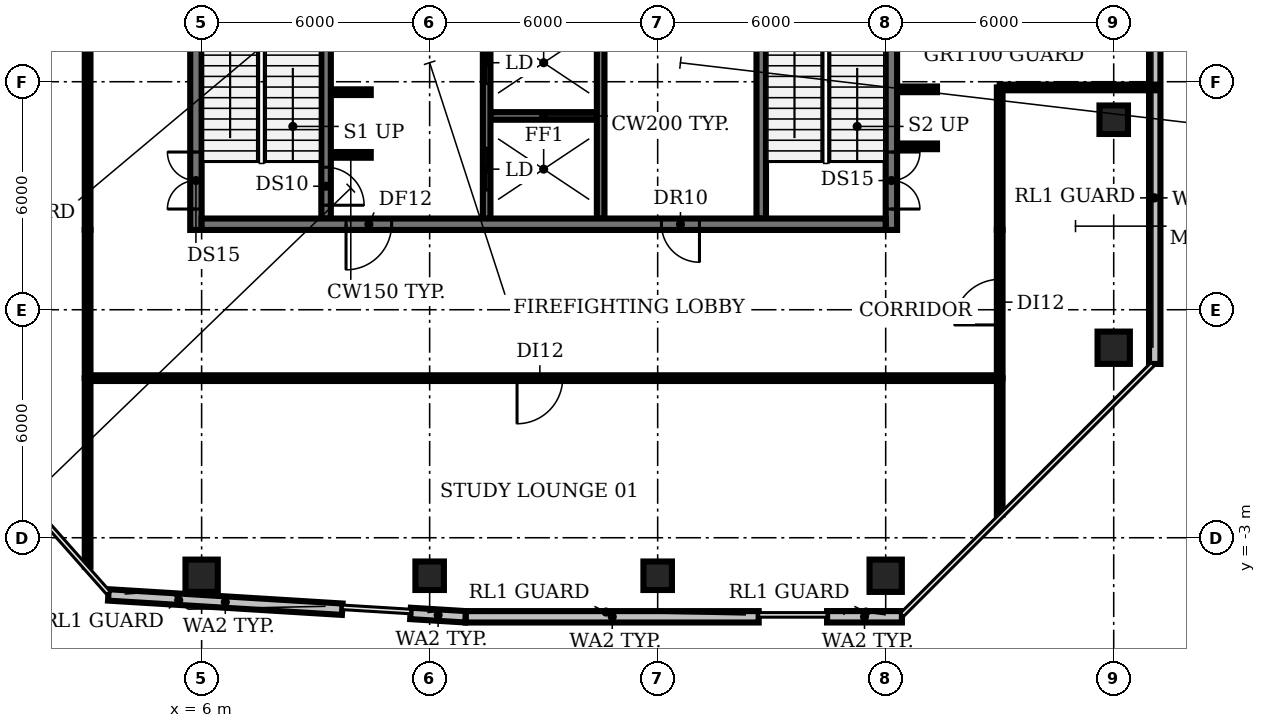
"""IFC4 building model, lengths in metres.
Left out: names, types, materials, properties, quantities, classifications, styles, units other than length and angle.
Written with IfcOpenShell. Run it as: python <this file> out.ifc"""

import sys

from ifc_helpers import new_model, si_unit, direction, frame, frame_2d, origin, origin_2d, place, context, subcontext, project, spatial, rectangle, circle, extrude, element, fill, save


model = new_model("IFC4")
c1 = context("Model", 3, precision=1e-05, world=origin(), true_north=direction((0.0, 1.0)))
c2 = subcontext(c1, "Body", "Model", "MODEL_VIEW")
j1 = project(units=[si_unit("LENGTHUNIT", "METRE"), si_unit("PLANEANGLEUNIT", "RADIAN")], contexts=[c1])
p1 = place(None, origin())
s1 = spatial("IfcSite", under=j1, at=p1, CompositionType="ELEMENT")
p2 = place(p1, origin())
s2 = spatial("IfcBuilding", under=s1, at=p2, CompositionType="ELEMENT")
p3 = place(p2, frame((0.0, 0.0, 272.6)))
s3 = spatial("IfcBuildingStorey", under=s2, at=p3, CompositionType="ELEMENT", Elevation=272.6)
p4 = place(p3, frame((6.0, -4.0, 0.0), z_axis=(0.0, 0.0, 1.0), x_axis=(1.0, 0.0, 0.0)))
e1 = element("IfcColumn", 1, at=p4, inside=s3, PredefinedType="COLUMN", context=c2, shape_type="SweptSolid", body=[
    extrude(circle(Radius=0.425, at=origin_2d()), origin(), (0.0, 0.0, 1.0), 3.85),
])
for number, where, z_axis, x_axis in (
    (2, (12.0, -4.0, 0.0), (0.0, 0.0, 1.0), (1.0, 0.0, 0.0)),
    (3, (18.0, -4.0, 0.0), (0.0, 0.0, 1.0), (1.0, 0.0, 0.0)),
):
    element("IfcColumn", number, at=place(p3, frame(where, z_axis=z_axis, x_axis=x_axis)), inside=s3, PredefinedType="COLUMN", context=c2, shape_type="SweptSolid", body=[
        extrude(rectangle(XDim=0.75, YDim=0.75, at=origin_2d()), origin(), (0.0, 0.0, 1.0), 3.85),
    ])
for number, where, z_axis, x_axis in (
    (4, (24.0, -4.0, 0.0), (0.0, 0.0, 1.0), (1.0, 0.0, 0.0)),
    (5, (30.0, 2.0, 0.0), (0.0, 0.0, 1.0), (1.0, 0.0, 0.0)),
):
    element("IfcColumn", number, at=place(p3, frame(where, z_axis=z_axis, x_axis=x_axis)), inside=s3, PredefinedType="COLUMN", context=c2, shape_type="SweptSolid", body=[
        extrude(circle(Radius=0.425, at=origin_2d()), origin(), (0.0, 0.0, 1.0), 3.85),
    ])
p5 = place(p3, frame((30.0, 8.0, 0.0), z_axis=(0.0, 0.0, 1.0), x_axis=(1.0, 0.0, 0.0)))
e6 = element("IfcColumn", 6, at=p5, inside=s3, PredefinedType="COLUMN", context=c2, shape_type="SweptSolid", body=[
    extrude(rectangle(XDim=0.75, YDim=0.75, at=origin_2d()), origin(), (0.0, 0.0, 1.0), 3.85),
])
p6 = place(p3, frame((3.546, -4.504, 0.0), z_axis=(0.0, 0.0, 1.0), x_axis=(0.99813413764, -0.061059342256, 0.0)))
e7 = element("IfcWall", 7, at=p6, inside=s3, PredefinedType="SOLIDWALL", context=c2, shape_type="SweptSolid", body=[
    extrude(rectangle(XDim=6.166, YDim=0.3, at=frame_2d((3.083, 0.0))), origin(), (0.0, 0.0, 1.0), 3.85),
])
p7 = place(p3, frame((11.497, -4.991, 0.0), z_axis=(0.0, 0.0, 1.0), x_axis=(0.998133330286, -0.061072538616, 0.0)))
e8 = element("IfcWall", 8, at=p7, inside=s3, PredefinedType="SOLIDWALL", context=c2, shape_type="SweptSolid", body=[
    extrude(rectangle(XDim=1.455, YDim=0.3, at=frame_2d((0.728, 0.0))), origin(), (0.0, 0.0, 1.0), 3.85),
])
p8 = place(p3, frame((12.952, -5.08, 0.0), z_axis=(0.0, 0.0, 1.0), x_axis=(1.0, 0.0, 0.0)))
e9 = element("IfcWall", 9, at=p8, inside=s3, PredefinedType="SOLIDWALL", context=c2, shape_type="SweptSolid", body=[
    extrude(rectangle(XDim=7.706, YDim=0.3, at=frame_2d((3.853, 0.0))), origin(), (0.0, 0.0, 1.0), 3.85),
])
p9 = place(p3, frame((22.458, -5.08, 0.0), z_axis=(0.0, 0.0, 1.0), x_axis=(1.0, 0.0, 0.0)))
e10 = element("IfcWall", 10, at=p9, inside=s3, PredefinedType="SOLIDWALL", context=c2, shape_type="SweptSolid", body=[
    extrude(rectangle(XDim=1.969, YDim=0.3, at=frame_2d((0.984, 0.0))), origin(), (0.0, 0.0, 1.0), 3.85),
])
p10 = place(p3, frame((31.08, 1.573, 0.0), z_axis=(0.0, 0.0, 1.0), x_axis=(0.0, 1.0, 0.0)))
e11 = element("IfcWall", 11, at=p10, inside=s3, PredefinedType="SOLIDWALL", context=c2, shape_type="SweptSolid", body=[
    extrude(rectangle(XDim=8.74, YDim=0.3, at=frame_2d((4.37, 0.0))), origin(), (0.0, 0.0, 1.0), 3.85),
])
p11 = place(p3, frame((9.4, 7.075, 0.0), z_axis=(0.0, 0.0, 1.0), x_axis=(1.0, 0.0, 0.0)))
e12 = element("IfcWall", 12, at=p11, inside=s3, PredefinedType="SHEAR", context=c2, shape_type="SweptSolid", body=[
    extrude(rectangle(XDim=1.05, YDim=0.15, at=frame_2d((0.525, 0.0))), origin(), (0.0, 0.0, 1.0), 3.85),
])
p12 = place(p3, frame((13.6, 8.1, 0.0), z_axis=(0.0, 0.0, 1.0), x_axis=(1.0, 0.0, 0.0)))
e13 = element("IfcWall", 13, at=p12, inside=s3, PredefinedType="SHEAR", context=c2, shape_type="SweptSolid", body=[
    extrude(rectangle(XDim=2.8, YDim=0.2, at=frame_2d((1.4, 0.0))), origin(), (0.0, 0.0, 1.0), 3.85),
])
p13 = place(p3, frame((9.4, 8.725, 0.0), z_axis=(0.0, 0.0, 1.0), x_axis=(1.0, 0.0, 0.0)))
e14 = element("IfcWall", 14, at=p13, inside=s3, PredefinedType="SHEAR", context=c2, shape_type="SweptSolid", body=[
    extrude(rectangle(XDim=1.05, YDim=0.15, at=frame_2d((0.525, 0.0))), origin(), (0.0, 0.0, 1.0), 3.85),
])
p14 = place(p3, frame((9.275, 11.825, 0.0), z_axis=(0.0, 0.0, 1.0), x_axis=(0.0, -1.0, 0.0)))
e15 = element("IfcWall", 15, at=p14, inside=s3, PredefinedType="SHEAR", context=c2, shape_type="SweptSolid", body=[
    extrude(rectangle(XDim=6.425, YDim=0.25, at=frame_2d((3.212, 0.0))), origin(), (0.0, 0.0, 1.0), 3.85),
])
p15 = place(p14, frame((5.075, 0.0, 0.0)))
e16 = element("IfcOpeningElement", 16, at=p15, cuts=e15, PredefinedType="OPENING", context=c2, shape_type="SweptSolid", body=[
    extrude(rectangle(XDim=1.0, YDim=2.1, at=frame_2d((0.5, 1.05))), frame((0.0, 0.135, 0.0), z_axis=(0.0, -1.0, 0.0), x_axis=(1.0, 0.0, 0.0)), (0.0, 0.0, 1.0), 0.27),
])
p16 = place(p3, frame((13.5, 5.4, 0.0), z_axis=(0.0, 0.0, 1.0), x_axis=(0.0, 1.0, 0.0)))
e17 = element("IfcWall", 17, at=p16, inside=s3, PredefinedType="SHEAR", context=c2, shape_type="SweptSolid", body=[
    extrude(rectangle(XDim=8.2, YDim=0.2, at=frame_2d((4.1, 0.0))), origin(), (0.0, 0.0, 1.0), 3.85),
])
p17 = place(p16, frame((0.75, 0.0, 0.0)))
e18 = element("IfcOpeningElement", 18, at=p17, cuts=e17, PredefinedType="OPENING", context=c2, shape_type="SweptSolid", body=[
    extrude(rectangle(XDim=1.1, YDim=2.1, at=frame_2d((0.55, 1.05))), frame((0.0, 0.11, 0.0), z_axis=(0.0, -1.0, 0.0), x_axis=(1.0, 0.0, 0.0)), (0.0, 0.0, 1.0), 0.22),
])
p18 = place(p16, frame((3.55, 0.0, 0.0)))
e19 = element("IfcOpeningElement", 19, at=p18, cuts=e17, PredefinedType="OPENING", context=c2, shape_type="SweptSolid", body=[
    extrude(rectangle(XDim=1.1, YDim=2.1, at=frame_2d((0.55, 1.05))), frame((0.0, 0.11, 0.0), z_axis=(0.0, -1.0, 0.0), x_axis=(1.0, 0.0, 0.0)), (0.0, 0.0, 1.0), 0.22),
])
p19 = place(p16, frame((6.35, 0.0, 0.0)))
e20 = element("IfcOpeningElement", 20, at=p19, cuts=e17, PredefinedType="OPENING", context=c2, shape_type="SweptSolid", body=[
    extrude(rectangle(XDim=1.1, YDim=2.1, at=frame_2d((0.55, 1.05))), frame((0.0, 0.11, 0.0), z_axis=(0.0, -1.0, 0.0), x_axis=(1.0, 0.0, 0.0)), (0.0, 0.0, 1.0), 0.22),
])
p20 = place(p3, frame((16.5, 5.4, 0.0), z_axis=(0.0, 0.0, 1.0), x_axis=(0.0, 1.0, 0.0)))
e21 = element("IfcWall", 21, at=p20, inside=s3, PredefinedType="SHEAR", context=c2, shape_type="SweptSolid", body=[
    extrude(rectangle(XDim=8.2, YDim=0.2, at=frame_2d((4.1, 0.0))), origin(), (0.0, 0.0, 1.0), 3.85),
])
p21 = place(p3, frame((20.725, 5.4, 0.0), z_axis=(0.0, 0.0, 1.0), x_axis=(0.0, 1.0, 0.0)))
e22 = element("IfcWall", 22, at=p21, inside=s3, PredefinedType="SHEAR", context=c2, shape_type="SweptSolid", body=[
    extrude(rectangle(XDim=6.3, YDim=0.25, at=frame_2d((3.15, 0.0))), origin(), (0.0, 0.0, 1.0), 3.85),
])
p22 = place(p3, frame((5.85, 5.1, 0.0), z_axis=(0.0, 0.0, 1.0), x_axis=(0.0, 1.0, 0.0)))
e23 = element("IfcWall", 23, at=p22, inside=s3, PredefinedType="SHEAR", context=c2, shape_type="SweptSolid", body=[
    extrude(rectangle(XDim=20.0, YDim=0.3, at=frame_2d((10.0, 0.0))), origin(), (0.0, 0.0, 1.0), 3.85),
])
p23 = place(p22, frame((0.55, 0.0, 0.0)))
e24 = element("IfcOpeningElement", 24, at=p23, cuts=e23, PredefinedType="OPENING", context=c2, shape_type="SweptSolid", body=[
    extrude(rectangle(XDim=1.5, YDim=2.1, at=frame_2d((0.75, 1.05))), frame((0.0, 0.16, 0.0), z_axis=(0.0, -1.0, 0.0), x_axis=(1.0, 0.0, 0.0)), (0.0, 0.0, 1.0), 0.32),
])
p24 = place(p22, frame((7.0, 0.0, 0.0)))
e25 = element("IfcOpeningElement", 25, at=p24, cuts=e23, PredefinedType="OPENING", context=c2, shape_type="SweptSolid", body=[
    extrude(rectangle(XDim=1.2, YDim=2.1, at=frame_2d((0.6, 1.05))), frame((0.0, 0.16, 0.0), z_axis=(0.0, -1.0, 0.0), x_axis=(1.0, 0.0, 0.0)), (0.0, 0.0, 1.0), 0.32),
])
p25 = place(p22, frame((13.55, 0.0, 0.0)))
e26 = element("IfcOpeningElement", 26, at=p25, cuts=e23, PredefinedType="OPENING", context=c2, shape_type="SweptSolid", body=[
    extrude(rectangle(XDim=1.2, YDim=2.1, at=frame_2d((0.6, 1.05))), frame((0.0, 0.16, 0.0), z_axis=(0.0, -1.0, 0.0), x_axis=(1.0, 0.0, 0.0)), (0.0, 0.0, 1.0), 0.32),
])
p26 = place(p3, frame((24.15, 25.655, 0.0), z_axis=(0.0, 0.0, 1.0), x_axis=(0.0, -1.0, 0.0)))
e27 = element("IfcWall", 27, at=p26, inside=s3, PredefinedType="SHEAR", context=c2, shape_type="SweptSolid", body=[
    extrude(rectangle(XDim=20.555, YDim=0.3, at=frame_2d((10.277, 0.0))), origin(), (0.0, 0.0, 1.0), 3.85),
])
p27 = place(p26, frame((18.505, 0.0, 0.0)))
e28 = element("IfcOpeningElement", 28, at=p27, cuts=e27, PredefinedType="OPENING", context=c2, shape_type="SweptSolid", body=[
    extrude(rectangle(XDim=1.5, YDim=2.1, at=frame_2d((0.75, 1.05))), frame((0.0, 0.16, 0.0), z_axis=(0.0, -1.0, 0.0), x_axis=(1.0, 0.0, 0.0)), (0.0, 0.0, 1.0), 0.32),
])
p28 = place(p26, frame((12.405, 0.0, 0.0)))
e29 = element("IfcOpeningElement", 29, at=p28, cuts=e27, PredefinedType="OPENING", context=c2, shape_type="SweptSolid", body=[
    extrude(rectangle(XDim=0.9, YDim=2.1, at=frame_2d((0.45, 1.05))), frame((0.0, 0.16, 0.0), z_axis=(0.0, -1.0, 0.0), x_axis=(1.0, 0.0, 0.0)), (0.0, 0.0, 1.0), 0.32),
])
p29 = place(p26, frame((6.405, 0.0, 0.0)))
e30 = element("IfcOpeningElement", 30, at=p29, cuts=e27, PredefinedType="OPENING", context=c2, shape_type="SweptSolid", body=[
    extrude(rectangle(XDim=2.0, YDim=2.1, at=frame_2d((1.0, 1.05))), frame((0.0, 0.16, 0.0), z_axis=(0.0, -1.0, 0.0), x_axis=(1.0, 0.0, 0.0)), (0.0, 0.0, 1.0), 0.32),
])
p30 = place(p3, frame((24.0, 5.25, 0.0), z_axis=(0.0, 0.0, 1.0), x_axis=(-1.0, 0.0, 0.0)))
e31 = element("IfcWall", 31, at=p30, inside=s3, PredefinedType="SHEAR", context=c2, shape_type="SweptSolid", body=[
    extrude(rectangle(XDim=18.0, YDim=0.3, at=frame_2d((9.0, 0.0))), origin(), (0.0, 0.0, 1.0), 3.85),
])
p31 = place(p30, frame((13.0, 0.0, 0.0)))
e32 = element("IfcOpeningElement", 32, at=p31, cuts=e31, PredefinedType="OPENING", context=c2, shape_type="SweptSolid", body=[
    extrude(rectangle(XDim=1.2, YDim=2.1, at=frame_2d((0.6, 1.05))), frame((0.0, 0.16, 0.0), z_axis=(0.0, -1.0, 0.0), x_axis=(1.0, 0.0, 0.0)), (0.0, 0.0, 1.0), 0.32),
])
p32 = place(p30, frame((4.9, 0.0, 0.0)))
e33 = element("IfcOpeningElement", 33, at=p32, cuts=e31, PredefinedType="OPENING", context=c2, shape_type="SweptSolid", body=[
    extrude(rectangle(XDim=1.0, YDim=2.1, at=frame_2d((0.5, 1.05))), frame((0.0, 0.16, 0.0), z_axis=(0.0, -1.0, 0.0), x_axis=(1.0, 0.0, 0.0)), (0.0, 0.0, 1.0), 0.32),
])
p33 = place(p3, frame((3.0, -3.76, 0.0), z_axis=(0.0, 0.0, 1.0), x_axis=(0.0, 1.0, 0.0)))
e34 = element("IfcWall", 34, at=p33, inside=s3, PredefinedType="PARTITIONING", context=c2, shape_type="SweptSolid", body=[
    extrude(rectangle(XDim=4.96, YDim=0.15, at=frame_2d((2.48, 0.0))), origin(), (0.0, 0.0, 1.0), 2.9),
])
p34 = place(p3, frame((3.0, 1.2, 0.0), z_axis=(0.0, 0.0, 1.0), x_axis=(0.0, 1.0, 0.0)))
e35 = element("IfcWall", 35, at=p34, inside=s3, PredefinedType="PARTITIONING", context=c2, shape_type="SweptSolid", body=[
    extrude(rectangle(XDim=3.9, YDim=0.15, at=frame_2d((1.95, 0.0))), origin(), (0.0, 0.0, 1.0), 2.9),
])
p35 = place(p3, frame((3.0, 5.1, 0.0), z_axis=(0.0, 0.0, 1.0), x_axis=(0.0, 1.0, 0.0)))
e36 = element("IfcWall", 36, at=p35, inside=s3, PredefinedType="PARTITIONING", context=c2, shape_type="SweptSolid", body=[
    extrude(rectangle(XDim=20.0, YDim=0.15, at=frame_2d((10.0, 0.0))), origin(), (0.0, 0.0, 1.0), 2.9),
])
p36 = place(p35, frame((9.3, 0.0, 0.0)))
e37 = element("IfcOpeningElement", 37, at=p36, cuts=e36, PredefinedType="OPENING", context=c2, shape_type="SweptSolid", body=[
    extrude(rectangle(XDim=1.2, YDim=2.1, at=frame_2d((0.6, 1.05))), frame((0.0, 0.085, 0.0), z_axis=(0.0, -1.0, 0.0), x_axis=(1.0, 0.0, 0.0)), (0.0, 0.0, 1.0), 0.17),
])
for number, where, z_axis, x_axis in (
    (38, (24.3, 7.3, 0.0), (0.0, 0.0, 1.0), (1.0, 0.0, 0.0)),
    (39, (24.3, 8.8, 0.0), (0.0, 0.0, 1.0), (1.0, 0.0, 0.0)),
):
    element("IfcWall", number, at=place(p3, frame(where, z_axis=z_axis, x_axis=x_axis)), inside=s3, PredefinedType="PARTITIONING", context=c2, shape_type="SweptSolid", body=[
        extrude(rectangle(XDim=1.05, YDim=0.15, at=frame_2d((0.525, 0.0))), origin(), (0.0, 0.0, 1.0), 2.9),
    ])
p37 = place(p3, frame((27.0, -2.39, 0.0), z_axis=(0.0, 0.0, 1.0), x_axis=(0.0, 1.0, 0.0)))
e40 = element("IfcWall", 40, at=p37, inside=s3, PredefinedType="PARTITIONING", context=c2, shape_type="SweptSolid", body=[
    extrude(rectangle(XDim=3.59, YDim=0.15, at=frame_2d((1.795, 0.0))), origin(), (0.0, 0.0, 1.0), 2.9),
])
p38 = place(p3, frame((27.0, 1.2, 0.0), z_axis=(0.0, 0.0, 1.0), x_axis=(-1.0, 0.0, 0.0)))
e41 = element("IfcWall", 41, at=p38, inside=s3, PredefinedType="PARTITIONING", context=c2, shape_type="SweptSolid", body=[
    extrude(rectangle(XDim=24.0, YDim=0.15, at=frame_2d((12.0, 0.0))), origin(), (0.0, 0.0, 1.0), 2.9),
])
p39 = place(p38, frame((11.5, 0.0, 0.0)))
e42 = element("IfcOpeningElement", 42, at=p39, cuts=e41, PredefinedType="OPENING", context=c2, shape_type="SweptSolid", body=[
    extrude(rectangle(XDim=1.2, YDim=2.1, at=frame_2d((0.6, 1.05))), frame((0.0, 0.085, 0.0), z_axis=(0.0, -1.0, 0.0), x_axis=(1.0, 0.0, 0.0)), (0.0, 0.0, 1.0), 0.17),
])
p40 = place(p3, frame((27.0, 1.2, 0.0), z_axis=(0.0, 0.0, 1.0), x_axis=(0.0, 1.0, 0.0)))
e43 = element("IfcWall", 43, at=p40, inside=s3, PredefinedType="PARTITIONING", context=c2, shape_type="SweptSolid", body=[
    extrude(rectangle(XDim=3.9, YDim=0.15, at=frame_2d((1.95, 0.0))), origin(), (0.0, 0.0, 1.0), 2.9),
])
p41 = place(p40, frame((1.4, 0.0, 0.0)))
e44 = element("IfcOpeningElement", 44, at=p41, cuts=e43, PredefinedType="OPENING", context=c2, shape_type="SweptSolid", body=[
    extrude(rectangle(XDim=1.2, YDim=2.1, at=frame_2d((0.6, 1.05))), frame((0.0, 0.085, 0.0), z_axis=(0.0, -1.0, 0.0), x_axis=(1.0, 0.0, 0.0)), (0.0, 0.0, 1.0), 0.17),
])
p42 = place(p3, frame((27.0, 5.1, 0.0), z_axis=(0.0, 0.0, 1.0), x_axis=(0.0, 1.0, 0.0)))
e45 = element("IfcWall", 45, at=p42, inside=s3, PredefinedType="PARTITIONING", context=c2, shape_type="SweptSolid", body=[
    extrude(rectangle(XDim=3.75, YDim=0.15, at=frame_2d((1.875, 0.0))), origin(), (0.0, 0.0, 1.0), 2.9),
])
p43 = place(p3, frame((27.0, 8.85, 0.0), z_axis=(0.0, 0.0, 1.0), x_axis=(1.0, 0.0, 0.0)))
e46 = element("IfcWall", 46, at=p43, inside=s3, PredefinedType="PARTITIONING", context=c2, shape_type="SweptSolid", body=[
    extrude(rectangle(XDim=4.09, YDim=0.15, at=frame_2d((2.045, 0.0))), origin(), (0.0, 0.0, 1.0), 2.9),
])
p44 = place(p15, origin())
e47 = element("IfcDoor", 47, at=p44, inside=s3, OperationType="SINGLE_SWING_RIGHT", PredefinedType="DOOR", context=c2, shape_type="SweptSolid", body=[
    extrude(rectangle(XDim=1.0, YDim=2.1, at=frame_2d((0.5, 1.05))), frame((0.0, 0.025, 0.0), z_axis=(0.0, -1.0, 0.0), x_axis=(1.0, 0.0, 0.0)), (0.0, 0.0, 1.0), 0.05),
])
fill(e16, e47)
p45 = place(p17, origin())
e48 = element("IfcDoor", 48, at=p45, inside=s3, OperationType="DOUBLE_DOOR_SLIDING", PredefinedType="DOOR", context=c2, shape_type="SweptSolid", body=[
    extrude(rectangle(XDim=1.1, YDim=2.1, at=frame_2d((0.55, 1.05))), frame((0.0, 0.025, 0.0), z_axis=(0.0, -1.0, 0.0), x_axis=(1.0, 0.0, 0.0)), (0.0, 0.0, 1.0), 0.05),
])
fill(e18, e48)
p46 = place(p18, origin())
e49 = element("IfcDoor", 49, at=p46, inside=s3, OperationType="DOUBLE_DOOR_SLIDING", PredefinedType="DOOR", context=c2, shape_type="SweptSolid", body=[
    extrude(rectangle(XDim=1.1, YDim=2.1, at=frame_2d((0.55, 1.05))), frame((0.0, 0.025, 0.0), z_axis=(0.0, -1.0, 0.0), x_axis=(1.0, 0.0, 0.0)), (0.0, 0.0, 1.0), 0.05),
])
fill(e19, e49)
p47 = place(p23, origin())
e50 = element("IfcDoor", 50, at=p47, inside=s3, OperationType="DOUBLE_DOOR_SINGLE_SWING", PredefinedType="DOOR", context=c2, shape_type="SweptSolid", body=[
    extrude(rectangle(XDim=1.5, YDim=2.1, at=frame_2d((0.75, 1.05))), frame((0.0, 0.025, 0.0), z_axis=(0.0, -1.0, 0.0), x_axis=(1.0, 0.0, 0.0)), (0.0, 0.0, 1.0), 0.05),
])
fill(e24, e50)
p48 = place(p27, origin())
e51 = element("IfcDoor", 51, at=p48, inside=s3, OperationType="DOUBLE_DOOR_SINGLE_SWING", PredefinedType="DOOR", context=c2, shape_type="SweptSolid", body=[
    extrude(rectangle(XDim=1.5, YDim=2.1, at=frame_2d((0.75, 1.05))), frame((0.0, 0.025, 0.0), z_axis=(0.0, -1.0, 0.0), x_axis=(1.0, 0.0, 0.0)), (0.0, 0.0, 1.0), 0.05),
])
fill(e28, e51)
p49 = place(p31, origin())
e52 = element("IfcDoor", 52, at=p49, inside=s3, OperationType="SINGLE_SWING_RIGHT", PredefinedType="DOOR", context=c2, shape_type="SweptSolid", body=[
    extrude(rectangle(XDim=1.2, YDim=2.1, at=frame_2d((0.6, 1.05))), frame((0.0, 0.025, 0.0), z_axis=(0.0, -1.0, 0.0), x_axis=(1.0, 0.0, 0.0)), (0.0, 0.0, 1.0), 0.05),
])
fill(e32, e52)
p50 = place(p32, origin())
e53 = element("IfcDoor", 53, at=p50, inside=s3, OperationType="SINGLE_SWING_LEFT", PredefinedType="DOOR", context=c2, shape_type="SweptSolid", body=[
    extrude(rectangle(XDim=1.0, YDim=2.1, at=frame_2d((0.5, 1.05))), frame((0.0, 0.025, 0.0), z_axis=(0.0, -1.0, 0.0), x_axis=(1.0, 0.0, 0.0)), (0.0, 0.0, 1.0), 0.05),
])
fill(e33, e53)
p51 = place(p39, origin())
e54 = element("IfcDoor", 54, at=p51, inside=s3, OperationType="SINGLE_SWING_RIGHT", PredefinedType="DOOR", context=c2, shape_type="SweptSolid", body=[
    extrude(rectangle(XDim=1.2, YDim=2.1, at=frame_2d((0.6, 1.05))), frame((0.0, 0.025, 0.0), z_axis=(0.0, -1.0, 0.0), x_axis=(1.0, 0.0, 0.0)), (0.0, 0.0, 1.0), 0.05),
])
fill(e42, e54)
p52 = place(p41, origin())
e55 = element("IfcDoor", 55, at=p52, inside=s3, OperationType="SINGLE_SWING_LEFT", PredefinedType="DOOR", context=c2, shape_type="SweptSolid", body=[
    extrude(rectangle(XDim=1.2, YDim=2.1, at=frame_2d((0.6, 1.05))), frame((0.0, 0.025, 0.0), z_axis=(0.0, -1.0, 0.0), x_axis=(1.0, 0.0, 0.0)), (0.0, 0.0, 1.0), 0.05),
])
fill(e44, e55)
save(model, sys.argv[1])
